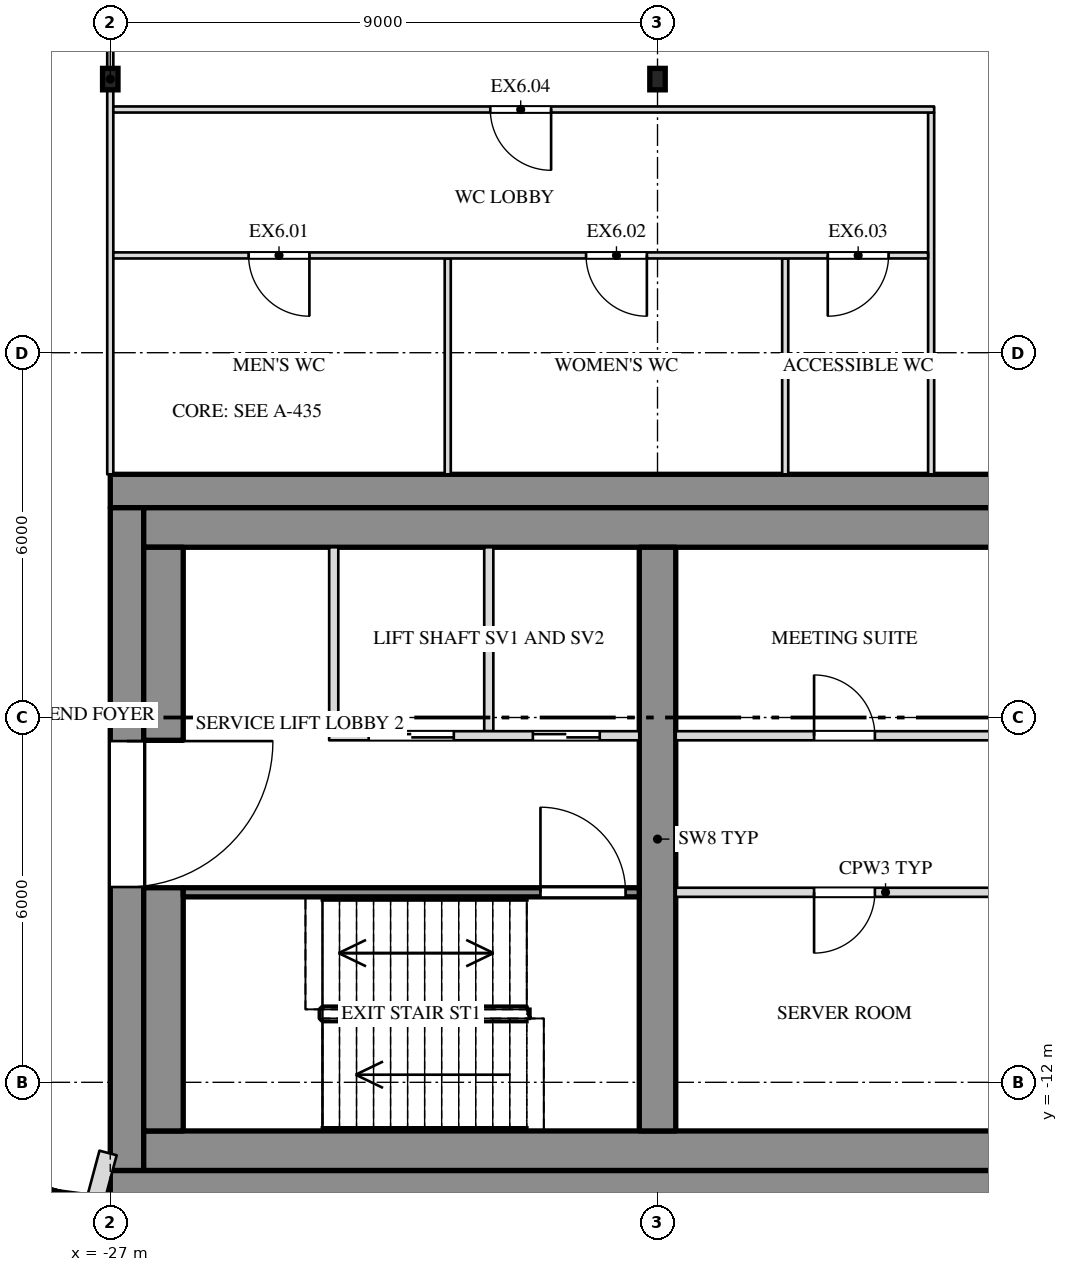
"""IFC4 building model, lengths in metres.
Left out: names, types, materials, properties, quantities, classifications, styles, units other than length and angle.
Written with IfcOpenShell. Run it as: python <this file> out.ifc"""

import sys

from ifc_helpers import new_model, si_unit, direction, frame, frame_2d, origin, origin_2d, place, context, subcontext, project, spatial, rectangle, i_section, extrude, element, fill, save


model = new_model("IFC4")
c1 = context("Model", 3, precision=1e-05, world=origin(), true_north=direction((0.0, 1.0)))
c2 = subcontext(c1, "Body", "Model", "MODEL_VIEW")
j1 = project(units=[si_unit("LENGTHUNIT", "METRE"), si_unit("PLANEANGLEUNIT", "RADIAN")], contexts=[c1])
p1 = place(None, origin())
s1 = spatial("IfcSite", under=j1, at=p1, CompositionType="ELEMENT")
p2 = place(p1, origin())
s2 = spatial("IfcBuilding", under=s1, at=p2, CompositionType="ELEMENT")
p3 = place(p2, frame((0.0, 0.0, 292.5)))
s3 = spatial("IfcBuildingStorey", under=s2, at=p3, CompositionType="ELEMENT", Elevation=292.5)
for number, where, z_axis, x_axis in (
    (1, (-27.0, 4.5, 0.0), (0.0, 0.0, 1.0), (1.0, 0.0, 0.0)),
    (2, (-18.0, 4.5, 0.0), (0.0, 0.0, 1.0), (1.0, 0.0, 0.0)),
):
    element("IfcColumn", number, at=place(p3, frame(where, z_axis=z_axis, x_axis=x_axis)), inside=s3, PredefinedType="COLUMN", context=c2, shape_type="SweptSolid", body=[
        extrude(i_section(OverallWidth=0.254, OverallDepth=0.353, WebThickness=0.01, FlangeThickness=0.016, at=origin_2d()), origin(), (0.0, 0.0, 1.0), 4.0),
    ])
p4 = place(p3, frame((-27.0, -2.275, 0.0), z_axis=(0.0, 0.0, 1.0), x_axis=(1.0, 0.0, 0.0)))
e3 = element("IfcWall", 3, at=p4, inside=s3, PredefinedType="SHEAR", context=c2, shape_type="SweptSolid", body=[
    extrude(rectangle(XDim=54.0, YDim=0.55, at=frame_2d((27.0, 0.0))), origin(), (0.0, 0.0, 1.0), 3.6),
])
p5 = place(p4, frame((15.15, 0.0, 0.0)))
e4 = element("IfcOpeningElement", 4, at=p5, cuts=e3, PredefinedType="OPENING", context=c2, shape_type="SweptSolid", body=[
    extrude(rectangle(XDim=2.4, YDim=2.1, at=frame_2d((1.2, 1.05))), frame((0.0, 0.287, 0.0), z_axis=(0.0, -1.0, 0.0), x_axis=(1.0, 0.0, 0.0)), (0.0, 0.0, 1.0), 0.574),
])
p6 = place(p4, frame((36.45, 0.0, 0.0)))
e5 = element("IfcOpeningElement", 5, at=p6, cuts=e3, PredefinedType="OPENING", context=c2, shape_type="SweptSolid", body=[
    extrude(rectangle(XDim=2.4, YDim=2.1, at=frame_2d((1.2, 1.05))), frame((0.0, 0.287, 0.0), z_axis=(0.0, -1.0, 0.0), x_axis=(1.0, 0.0, 0.0)), (0.0, 0.0, 1.0), 0.574),
])
p7 = place(p3, frame((-27.0, -13.725, 0.0), z_axis=(0.0, 0.0, 1.0), x_axis=(1.0, 0.0, 0.0)))
e6 = element("IfcWall", 6, at=p7, inside=s3, PredefinedType="SHEAR", context=c2, shape_type="SweptSolid", body=[
    extrude(rectangle(XDim=54.0, YDim=0.55, at=frame_2d((27.0, 0.0))), origin(), (0.0, 0.0, 1.0), 3.6),
])
p8 = place(p3, frame((-26.725, -13.45, 0.0), z_axis=(0.0, 0.0, 1.0), x_axis=(0.0, 1.0, 0.0)))
e7 = element("IfcWall", 7, at=p8, inside=s3, PredefinedType="SHEAR", context=c2, shape_type="SweptSolid", body=[
    extrude(rectangle(XDim=10.9, YDim=0.55, at=frame_2d((5.45, 0.0))), origin(), (0.0, 0.0, 1.0), 3.6),
])
p9 = place(p8, frame((4.662, 0.0, 0.0)))
e8 = element("IfcOpeningElement", 8, at=p9, cuts=e7, PredefinedType="OPENING", context=c2, shape_type="SweptSolid", body=[
    extrude(rectangle(XDim=2.4, YDim=2.1, at=frame_2d((1.2, 1.05))), frame((0.0, 0.287, 0.0), z_axis=(0.0, -1.0, 0.0), x_axis=(1.0, 0.0, 0.0)), (0.0, 0.0, 1.0), 0.574),
])
p10 = place(p3, frame((-26.45, -2.875, 0.0), z_axis=(0.0, 0.0, 1.0), x_axis=(1.0, 0.0, 0.0)))
e9 = element("IfcWall", 9, at=p10, inside=s3, PredefinedType="SHEAR", context=c2, shape_type="SweptSolid", body=[
    extrude(rectangle(XDim=14.45, YDim=0.65, at=frame_2d((7.225, 0.0))), origin(), (0.0, 0.0, 1.0), 3.6),
])
p11 = place(p3, frame((-26.45, -13.125, 0.0), z_axis=(0.0, 0.0, 1.0), x_axis=(1.0, 0.0, 0.0)))
e10 = element("IfcWall", 10, at=p11, inside=s3, PredefinedType="SHEAR", context=c2, shape_type="SweptSolid", body=[
    extrude(rectangle(XDim=52.9, YDim=0.65, at=frame_2d((26.45, 0.0))), origin(), (0.0, 0.0, 1.0), 3.6),
])
p12 = place(p3, frame((-26.125, -12.8, 0.0), z_axis=(0.0, 0.0, 1.0), x_axis=(0.0, 1.0, 0.0)))
e11 = element("IfcWall", 11, at=p12, inside=s3, PredefinedType="SHEAR", context=c2, shape_type="SweptSolid", body=[
    extrude(rectangle(XDim=4.0, YDim=0.65, at=frame_2d((2.0, 0.0))), origin(), (0.0, 0.0, 1.0), 3.6),
])
p13 = place(p3, frame((-26.125, -6.375, 0.0), z_axis=(0.0, 0.0, 1.0), x_axis=(0.0, 1.0, 0.0)))
e12 = element("IfcWall", 12, at=p13, inside=s3, PredefinedType="SHEAR", context=c2, shape_type="SweptSolid", body=[
    extrude(rectangle(XDim=3.175, YDim=0.65, at=frame_2d((1.587, 0.0))), origin(), (0.0, 0.0, 1.0), 3.6),
])
p14 = place(p3, frame((-18.0, -12.8, 0.0), z_axis=(0.0, 0.0, 1.0), x_axis=(0.0, 1.0, 0.0)))
e13 = element("IfcWall", 13, at=p14, inside=s3, PredefinedType="SHEAR", context=c2, shape_type="SweptSolid", body=[
    extrude(rectangle(XDim=9.6, YDim=0.6, at=frame_2d((4.8, 0.0))), origin(), (0.0, 0.0, 1.0), 3.6),
])
p15 = place(p3, frame((-27.0, -2.0, 0.0), z_axis=(0.0, 0.0, 1.0), x_axis=(0.0, 1.0, 0.0)))
e14 = element("IfcWall", 14, at=p15, inside=s3, PredefinedType="PARTITIONING", context=c2, shape_type="SweptSolid", body=[
    extrude(rectangle(XDim=6.323, YDim=0.1, at=frame_2d((3.162, 0.0))), origin(), (0.0, 0.0, 1.0), 2.668),
])
p16 = place(p3, frame((-27.0, 4.677, 0.0), z_axis=(0.0, 0.0, 1.0), x_axis=(0.0, 1.0, 0.0)))
e15 = element("IfcWall", 15, at=p16, inside=s3, PredefinedType="PARTITIONING", context=c2, shape_type="SweptSolid", body=[
    extrude(rectangle(XDim=3.003, YDim=0.1, at=frame_2d((1.502, 0.0))), origin(), (0.0, 0.0, 1.0), 2.668),
])
for number, where, z_axis, x_axis in (
    (16, (-21.45, -2.0, 0.0), (0.0, 0.0, 1.0), (0.0, 1.0, 0.0)),
    (17, (-15.9, -2.0, 0.0), (0.0, 0.0, 1.0), (0.0, 1.0, 0.0)),
):
    element("IfcWall", number, at=place(p3, frame(where, z_axis=z_axis, x_axis=x_axis)), inside=s3, PredefinedType="PARTITIONING", context=c2, shape_type="SweptSolid", body=[
        extrude(rectangle(XDim=3.55, YDim=0.1, at=frame_2d((1.775, 0.0))), origin(), (0.0, 0.0, 1.0), 3.6),
    ])
p17 = place(p3, frame((-13.5, -2.0, 0.0), z_axis=(0.0, 0.0, 1.0), x_axis=(0.0, 1.0, 0.0)))
e18 = element("IfcWall", 18, at=p17, inside=s3, PredefinedType="PARTITIONING", context=c2, shape_type="SweptSolid", body=[
    extrude(rectangle(XDim=5.95, YDim=0.1, at=frame_2d((2.975, 0.0))), origin(), (0.0, 0.0, 1.0), 2.988),
])
p18 = place(p3, frame((-26.95, 1.6, 0.0), z_axis=(0.0, 0.0, 1.0), x_axis=(1.0, 0.0, 0.0)))
e19 = element("IfcWall", 19, at=p18, inside=s3, PredefinedType="PARTITIONING", context=c2, shape_type="SweptSolid", body=[
    extrude(rectangle(XDim=13.4, YDim=0.1, at=frame_2d((6.7, 0.0))), origin(), (0.0, 0.0, 1.0), 3.6),
])
p19 = place(p18, frame((2.225, 0.0, 0.0)))
e20 = element("IfcOpeningElement", 20, at=p19, cuts=e19, PredefinedType="OPENING", context=c2, shape_type="SweptSolid", body=[
    extrude(rectangle(XDim=1.0, YDim=2.1, at=frame_2d((0.5, 1.05))), frame((0.0, 0.062, 0.0), z_axis=(0.0, -1.0, 0.0), x_axis=(1.0, 0.0, 0.0)), (0.0, 0.0, 1.0), 0.124),
])
p20 = place(p18, frame((7.775, 0.0, 0.0)))
e21 = element("IfcOpeningElement", 21, at=p20, cuts=e19, PredefinedType="OPENING", context=c2, shape_type="SweptSolid", body=[
    extrude(rectangle(XDim=1.0, YDim=2.1, at=frame_2d((0.5, 1.05))), frame((0.0, 0.062, 0.0), z_axis=(0.0, -1.0, 0.0), x_axis=(1.0, 0.0, 0.0)), (0.0, 0.0, 1.0), 0.124),
])
p21 = place(p18, frame((11.75, 0.0, 0.0)))
e22 = element("IfcOpeningElement", 22, at=p21, cuts=e19, PredefinedType="OPENING", context=c2, shape_type="SweptSolid", body=[
    extrude(rectangle(XDim=1.0, YDim=2.1, at=frame_2d((0.5, 1.05))), frame((0.0, 0.062, 0.0), z_axis=(0.0, -1.0, 0.0), x_axis=(1.0, 0.0, 0.0)), (0.0, 0.0, 1.0), 0.124),
])
p22 = place(p3, frame((-26.95, 4.0, 0.0), z_axis=(0.0, 0.0, 1.0), x_axis=(1.0, 0.0, 0.0)))
e23 = element("IfcWall", 23, at=p22, inside=s3, PredefinedType="PARTITIONING", context=c2, shape_type="SweptSolid", body=[
    extrude(rectangle(XDim=13.5, YDim=0.1, at=frame_2d((6.75, 0.0))), origin(), (0.0, 0.0, 1.0), 3.6),
])
p23 = place(p22, frame((6.2, 0.0, 0.0)))
e24 = element("IfcOpeningElement", 24, at=p23, cuts=e23, PredefinedType="OPENING", context=c2, shape_type="SweptSolid", body=[
    extrude(rectangle(XDim=1.0, YDim=2.1, at=frame_2d((0.5, 1.05))), frame((0.0, 0.062, 0.0), z_axis=(0.0, -1.0, 0.0), x_axis=(1.0, 0.0, 0.0)), (0.0, 0.0, 1.0), 0.124),
])
p24 = place(p3, frame((-27.281, -13.51, 0.0), z_axis=(0.0, 0.0, 1.0), x_axis=(0.965888567797, -0.258958055677, 0.0)))
e25 = element("IfcWall", 25, at=p24, inside=s3, PredefinedType="SOLIDWALL", context=c2, shape_type="SweptSolid", body=[
    extrude(rectangle(XDim=0.293, YDim=0.8, at=frame_2d((0.146, 0.0))), origin(), (0.0, 0.0, 1.0), 3.6),
])
for number, where, z_axis, x_axis in (
    (26, (-20.775, -6.225, 0.0), (0.0, 0.0, 1.0), (0.0, 1.0, 0.0)),
    (27, (-23.325, -6.225, 0.0), (0.0, 0.0, 1.0), (0.0, 1.0, 0.0)),
):
    element("IfcWall", number, at=place(p3, frame(where, z_axis=z_axis, x_axis=x_axis)), inside=s3, PredefinedType="PARTITIONING", context=c2, shape_type="SweptSolid", body=[
        extrude(rectangle(XDim=3.025, YDim=0.15, at=frame_2d((1.513, 0.0))), origin(), (0.0, 0.0, 1.0), 3.6),
    ])
p25 = place(p3, frame((-23.4, -6.3, 0.0), z_axis=(0.0, 0.0, 1.0), x_axis=(1.0, 0.0, 0.0)))
e28 = element("IfcWall", 28, at=p25, inside=s3, PredefinedType="PARTITIONING", context=c2, shape_type="SweptSolid", body=[
    extrude(rectangle(XDim=5.1, YDim=0.15, at=frame_2d((2.55, 0.0))), origin(), (0.0, 0.0, 1.0), 3.6),
])
p26 = place(p25, frame((0.65, 0.0, 0.0)))
e29 = element("IfcOpeningElement", 29, at=p26, cuts=e28, PredefinedType="OPENING", context=c2, shape_type="SweptSolid", body=[
    extrude(rectangle(XDim=1.4, YDim=2.1, at=frame_2d((0.7, 1.05))), frame((0.0, 0.087, 0.0), z_axis=(0.0, -1.0, 0.0), x_axis=(1.0, 0.0, 0.0)), (0.0, 0.0, 1.0), 0.174),
])
p27 = place(p25, frame((3.35, 0.0, 0.0)))
e30 = element("IfcOpeningElement", 30, at=p27, cuts=e28, PredefinedType="OPENING", context=c2, shape_type="SweptSolid", body=[
    extrude(rectangle(XDim=1.1, YDim=2.1, at=frame_2d((0.55, 1.05))), frame((0.0, 0.087, 0.0), z_axis=(0.0, -1.0, 0.0), x_axis=(1.0, 0.0, 0.0)), (0.0, 0.0, 1.0), 0.174),
])
p28 = place(p3, frame((-17.7, -6.3, 0.0), z_axis=(0.0, 0.0, 1.0), x_axis=(1.0, 0.0, 0.0)))
e31 = element("IfcWall", 31, at=p28, inside=s3, PredefinedType="PARTITIONING", context=c2, shape_type="SweptSolid", body=[
    extrude(rectangle(XDim=5.7, YDim=0.15, at=frame_2d((2.85, 0.0))), origin(), (0.0, 0.0, 1.0), 3.6),
])
p29 = place(p28, frame((2.275, 0.0, 0.0)))
e32 = element("IfcOpeningElement", 32, at=p29, cuts=e31, PredefinedType="OPENING", context=c2, shape_type="SweptSolid", body=[
    extrude(rectangle(XDim=1.0, YDim=2.1, at=frame_2d((0.5, 1.05))), frame((0.0, 0.087, 0.0), z_axis=(0.0, -1.0, 0.0), x_axis=(1.0, 0.0, 0.0)), (0.0, 0.0, 1.0), 0.174),
])
p30 = place(p3, frame((-25.8, -8.875, 0.0), z_axis=(0.0, 0.0, 1.0), x_axis=(1.0, 0.0, 0.0)))
e33 = element("IfcWall", 33, at=p30, inside=s3, PredefinedType="SHEAR", context=c2, shape_type="SweptSolid", body=[
    extrude(rectangle(XDim=7.5, YDim=0.15, at=frame_2d((3.75, 0.0))), origin(), (0.0, 0.0, 1.0), 3.6),
])
p31 = place(p30, frame((5.875, 0.0, 0.0)))
e34 = element("IfcOpeningElement", 34, at=p31, cuts=e33, PredefinedType="OPENING", context=c2, shape_type="SweptSolid", body=[
    extrude(rectangle(XDim=1.4, YDim=2.1, at=frame_2d((0.7, 1.05))), frame((0.0, 0.087, 0.0), z_axis=(0.0, -1.0, 0.0), x_axis=(1.0, 0.0, 0.0)), (0.0, 0.0, 1.0), 0.174),
])
p32 = place(p3, frame((-17.7, -8.875, 0.0), z_axis=(0.0, 0.0, 1.0), x_axis=(1.0, 0.0, 0.0)))
e35 = element("IfcWall", 35, at=p32, inside=s3, PredefinedType="PARTITIONING", context=c2, shape_type="SweptSolid", body=[
    extrude(rectangle(XDim=6.9, YDim=0.15, at=frame_2d((3.45, 0.0))), origin(), (0.0, 0.0, 1.0), 3.6),
])
p33 = place(p32, frame((2.275, 0.0, 0.0)))
e36 = element("IfcOpeningElement", 36, at=p33, cuts=e35, PredefinedType="OPENING", context=c2, shape_type="SweptSolid", body=[
    extrude(rectangle(XDim=1.0, YDim=2.1, at=frame_2d((0.5, 1.05))), frame((0.0, 0.087, 0.0), z_axis=(0.0, -1.0, 0.0), x_axis=(1.0, 0.0, 0.0)), (0.0, 0.0, 1.0), 0.174),
])
p34 = place(p19, origin())
e37 = element("IfcDoor", 37, at=p34, inside=s3, OperationType="SINGLE_SWING_LEFT", PredefinedType="DOOR", context=c2, shape_type="SweptSolid", body=[
    extrude(rectangle(XDim=1.0, YDim=2.1, at=frame_2d((0.5, 1.05))), frame((0.0, 0.025, 0.0), z_axis=(0.0, -1.0, 0.0), x_axis=(1.0, 0.0, 0.0)), (0.0, 0.0, 1.0), 0.05),
])
fill(e20, e37)
p35 = place(p20, origin())
e38 = element("IfcDoor", 38, at=p35, inside=s3, OperationType="SINGLE_SWING_LEFT", PredefinedType="DOOR", context=c2, shape_type="SweptSolid", body=[
    extrude(rectangle(XDim=1.0, YDim=2.1, at=frame_2d((0.5, 1.05))), frame((0.0, 0.025, 0.0), z_axis=(0.0, -1.0, 0.0), x_axis=(1.0, 0.0, 0.0)), (0.0, 0.0, 1.0), 0.05),
])
fill(e21, e38)
p36 = place(p21, origin())
e39 = element("IfcDoor", 39, at=p36, inside=s3, OperationType="SINGLE_SWING_RIGHT", PredefinedType="DOOR", context=c2, shape_type="SweptSolid", body=[
    extrude(rectangle(XDim=1.0, YDim=2.1, at=frame_2d((0.5, 1.05))), frame((0.0, 0.025, 0.0), z_axis=(0.0, -1.0, 0.0), x_axis=(1.0, 0.0, 0.0)), (0.0, 0.0, 1.0), 0.05),
])
fill(e22, e39)
p37 = place(p23, origin())
e40 = element("IfcDoor", 40, at=p37, inside=s3, OperationType="SINGLE_SWING_LEFT", PredefinedType="DOOR", context=c2, shape_type="SweptSolid", body=[
    extrude(rectangle(XDim=1.0, YDim=2.1, at=frame_2d((0.5, 1.05))), frame((0.0, 0.025, 0.0), z_axis=(0.0, -1.0, 0.0), x_axis=(1.0, 0.0, 0.0)), (0.0, 0.0, 1.0), 0.05),
])
fill(e24, e40)
p38 = place(p9, origin())
e41 = element("IfcDoor", 41, at=p38, inside=s3, OperationType="DOUBLE_DOOR_SINGLE_SWING", PredefinedType="DOOR", context=c2, shape_type="SweptSolid", body=[
    extrude(rectangle(XDim=2.4, YDim=2.1, at=frame_2d((1.2, 1.05))), frame((0.0, 0.025, 0.0), z_axis=(0.0, -1.0, 0.0), x_axis=(1.0, 0.0, 0.0)), (0.0, 0.0, 1.0), 0.05),
])
fill(e8, e41)
p39 = place(p26, origin())
e42 = element("IfcDoor", 42, at=p39, inside=s3, OperationType="SLIDING_TO_RIGHT", PredefinedType="DOOR", context=c2, shape_type="SweptSolid", body=[
    extrude(rectangle(XDim=1.4, YDim=2.1, at=frame_2d((0.7, 1.05))), frame((0.0, 0.025, 0.0), z_axis=(0.0, -1.0, 0.0), x_axis=(1.0, 0.0, 0.0)), (0.0, 0.0, 1.0), 0.05),
])
fill(e29, e42)
p40 = place(p27, origin())
e43 = element("IfcDoor", 43, at=p40, inside=s3, OperationType="SLIDING_TO_LEFT", PredefinedType="DOOR", context=c2, shape_type="SweptSolid", body=[
    extrude(rectangle(XDim=1.1, YDim=2.1, at=frame_2d((0.55, 1.05))), frame((0.0, 0.025, 0.0), z_axis=(0.0, -1.0, 0.0), x_axis=(1.0, 0.0, 0.0)), (0.0, 0.0, 1.0), 0.05),
])
fill(e30, e43)
p41 = place(p31, origin())
e44 = element("IfcDoor", 44, at=p41, inside=s3, OperationType="DOUBLE_DOOR_SINGLE_SWING", PredefinedType="DOOR", context=c2, shape_type="SweptSolid", body=[
    extrude(rectangle(XDim=1.4, YDim=2.1, at=frame_2d((0.7, 1.05))), frame((0.0, 0.025, 0.0), z_axis=(0.0, -1.0, 0.0), x_axis=(1.0, 0.0, 0.0)), (0.0, 0.0, 1.0), 0.05),
])
fill(e34, e44)
p42 = place(p33, origin())
e45 = element("IfcDoor", 45, at=p42, inside=s3, OperationType="SINGLE_SWING_RIGHT", PredefinedType="DOOR", context=c2, shape_type="SweptSolid", body=[
    extrude(rectangle(XDim=1.0, YDim=2.1, at=frame_2d((0.5, 1.05))), frame((0.0, 0.025, 0.0), z_axis=(0.0, -1.0, 0.0), x_axis=(1.0, 0.0, 0.0)), (0.0, 0.0, 1.0), 0.05),
])
fill(e36, e45)
p43 = place(p29, origin())
e46 = element("IfcDoor", 46, at=p43, inside=s3, OperationType="SINGLE_SWING_LEFT", PredefinedType="DOOR", context=c2, shape_type="SweptSolid", body=[
    extrude(rectangle(XDim=1.0, YDim=2.1, at=frame_2d((0.5, 1.05))), frame((0.0, 0.025, 0.0), z_axis=(0.0, -1.0, 0.0), x_axis=(1.0, 0.0, 0.0)), (0.0, 0.0, 1.0), 0.05),
])
fill(e32, e46)
save(model, sys.argv[1])
